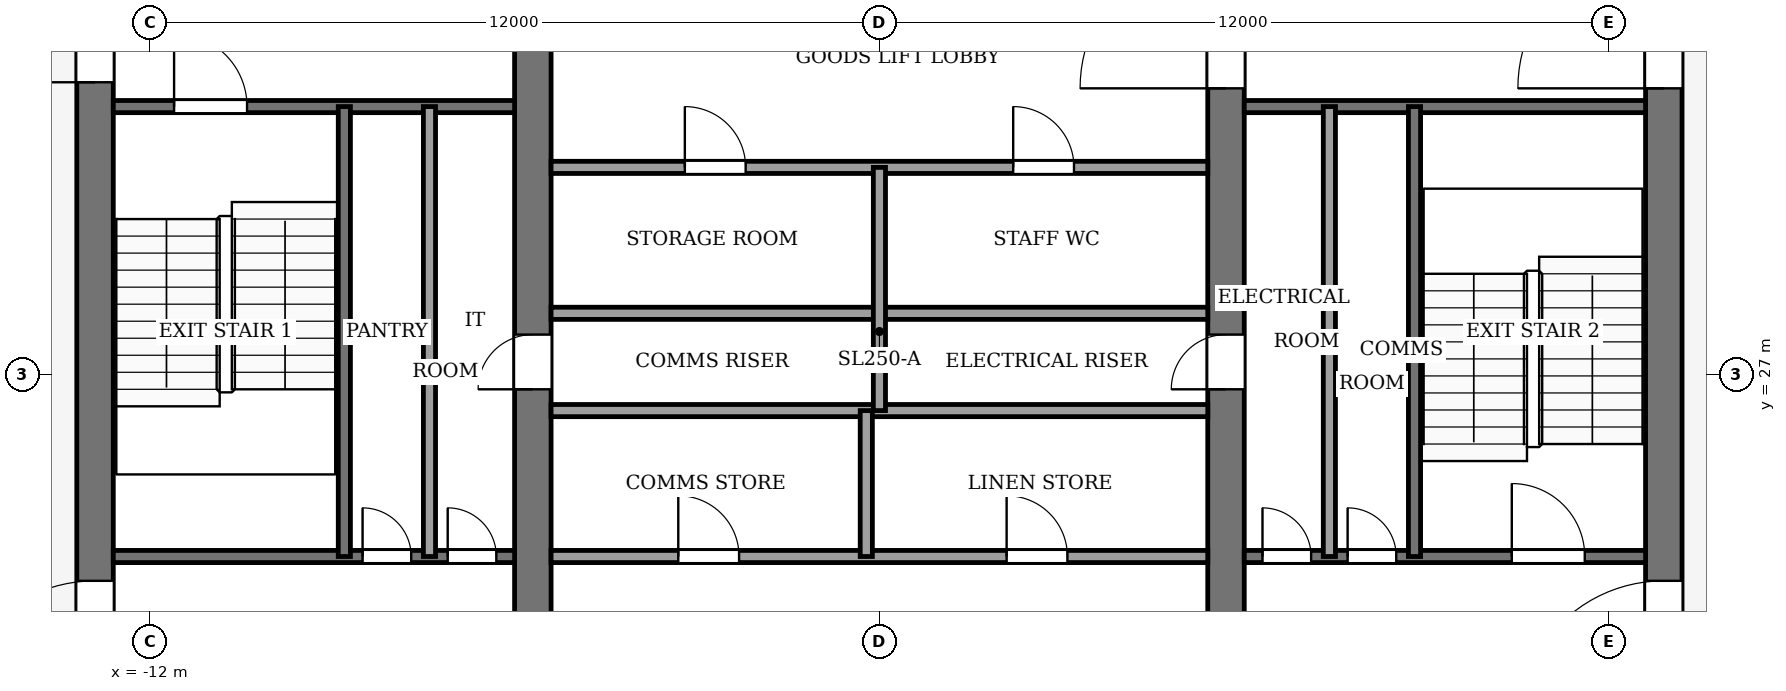
"""IFC4 building model, lengths in metres.
Left out: names, types, materials, properties, quantities, classifications, styles, units other than length and angle.
Written with IfcOpenShell. Run it as: python <this file> out.ifc"""

import sys

from ifc_helpers import new_model, si_unit, direction, frame, frame_2d, origin, place, context, subcontext, project, spatial, rectangle, extrude, element, fill, save


model = new_model("IFC4")
c1 = context("Model", 3, precision=1e-05, world=origin(), true_north=direction((0.0, 1.0)))
c2 = subcontext(c1, "Body", "Model", "MODEL_VIEW")
j1 = project(units=[si_unit("LENGTHUNIT", "METRE"), si_unit("PLANEANGLEUNIT", "RADIAN")], contexts=[c1])
p1 = place(None, origin())
s1 = spatial("IfcSite", under=j1, at=p1, CompositionType="ELEMENT")
p2 = place(p1, origin())
s2 = spatial("IfcBuilding", under=s1, at=p2, CompositionType="ELEMENT")
p3 = place(p2, frame((0.0, 0.0, 302.0)))
s3 = spatial("IfcBuildingStorey", under=s2, at=p3, CompositionType="ELEMENT", Elevation=302.0)
p4 = place(p3, frame((-12.9, 18.4, -0.13), z_axis=(0.0, 0.0, 1.0), x_axis=(0.0, 1.0, 0.0)))
e1 = element("IfcWall", 1, at=p4, inside=s3, PredefinedType="SHEAR", context=c2, shape_type="SweptSolid", body=[
    extrude(rectangle(XDim=19.2, YDim=0.6, at=frame_2d((9.6, 0.0))), origin(), (0.0, 0.0, 1.0), 4.0),
])
p5 = place(p4, frame((2.8, 0.0, 0.13)))
e2 = element("IfcOpeningElement", 2, at=p5, cuts=e1, PredefinedType="OPENING", context=c2, shape_type="SweptSolid", body=[
    extrude(rectangle(XDim=2.4, YDim=2.4, at=frame_2d((1.2, 1.2))), frame((0.0, 0.31, 0.0), z_axis=(0.0, -1.0, 0.0), x_axis=(1.0, 0.0, 0.0)), (0.0, 0.0, 1.0), 0.62),
])
p6 = place(p4, frame((13.4, 0.0, 0.13)))
e3 = element("IfcOpeningElement", 3, at=p6, cuts=e1, PredefinedType="OPENING", context=c2, shape_type="SweptSolid", body=[
    extrude(rectangle(XDim=1.4, YDim=2.2, at=frame_2d((0.7, 1.1))), frame((0.0, 0.31, 0.0), z_axis=(0.0, -1.0, 0.0), x_axis=(1.0, 0.0, 0.0)), (0.0, 0.0, 1.0), 0.62),
])
p7 = place(p3, frame((12.9, 18.4, -0.13), z_axis=(0.0, 0.0, 1.0), x_axis=(0.0, 1.0, 0.0)))
e4 = element("IfcWall", 4, at=p7, inside=s3, PredefinedType="SHEAR", context=c2, shape_type="SweptSolid", body=[
    extrude(rectangle(XDim=19.2, YDim=0.6, at=frame_2d((9.6, 0.0))), origin(), (0.0, 0.0, 1.0), 4.0),
])
p8 = place(p7, frame((2.8, 0.0, 0.13)))
e5 = element("IfcOpeningElement", 5, at=p8, cuts=e4, PredefinedType="OPENING", context=c2, shape_type="SweptSolid", body=[
    extrude(rectangle(XDim=2.4, YDim=2.4, at=frame_2d((1.2, 1.2))), frame((0.0, 0.31, 0.0), z_axis=(0.0, -1.0, 0.0), x_axis=(1.0, 0.0, 0.0)), (0.0, 0.0, 1.0), 0.62),
])
p9 = place(p7, frame((13.3, 0.0, 0.13)))
e6 = element("IfcOpeningElement", 6, at=p9, cuts=e4, PredefinedType="OPENING", context=c2, shape_type="SweptSolid", body=[
    extrude(rectangle(XDim=2.4, YDim=2.4, at=frame_2d((1.2, 1.2))), frame((0.0, 0.31, 0.0), z_axis=(0.0, -1.0, 0.0), x_axis=(1.0, 0.0, 0.0)), (0.0, 0.0, 1.0), 0.62),
])
p10 = place(p3, frame((-5.7, 18.4, -0.13), z_axis=(0.0, 0.0, 1.0), x_axis=(0.0, 1.0, 0.0)))
e7 = element("IfcWall", 7, at=p10, inside=s3, PredefinedType="SHEAR", context=c2, shape_type="SweptSolid", body=[
    extrude(rectangle(XDim=19.2, YDim=0.6, at=frame_2d((9.6, 0.0))), origin(), (0.0, 0.0, 1.0), 4.0),
])
p11 = place(p10, frame((8.35, 0.0, 0.13)))
e8 = element("IfcOpeningElement", 8, at=p11, cuts=e7, PredefinedType="OPENING", context=c2, shape_type="SweptSolid", body=[
    extrude(rectangle(XDim=0.9, YDim=2.1, at=frame_2d((0.45, 1.05))), frame((0.0, 0.31, 0.0), z_axis=(0.0, -1.0, 0.0), x_axis=(1.0, 0.0, 0.0)), (0.0, 0.0, 1.0), 0.62),
])
p12 = place(p3, frame((5.7, 18.4, -0.13), z_axis=(0.0, 0.0, 1.0), x_axis=(0.0, 1.0, 0.0)))
e9 = element("IfcWall", 9, at=p12, inside=s3, PredefinedType="SHEAR", context=c2, shape_type="SweptSolid", body=[
    extrude(rectangle(XDim=19.2, YDim=0.6, at=frame_2d((9.6, 0.0))), origin(), (0.0, 0.0, 1.0), 4.0),
])
p13 = place(p12, frame((8.35, 0.0, 0.13)))
e10 = element("IfcOpeningElement", 10, at=p13, cuts=e9, PredefinedType="OPENING", context=c2, shape_type="SweptSolid", body=[
    extrude(rectangle(XDim=0.9, YDim=2.1, at=frame_2d((0.45, 1.05))), frame((0.0, 0.31, 0.0), z_axis=(0.0, -1.0, 0.0), x_axis=(1.0, 0.0, 0.0)), (0.0, 0.0, 1.0), 0.62),
])
p14 = place(p12, frame((13.3, 0.0, 0.13)))
e11 = element("IfcOpeningElement", 11, at=p14, cuts=e9, PredefinedType="OPENING", context=c2, shape_type="SweptSolid", body=[
    extrude(rectangle(XDim=2.4, YDim=2.4, at=frame_2d((1.2, 1.2))), frame((0.0, 0.31, 0.0), z_axis=(0.0, -1.0, 0.0), x_axis=(1.0, 0.0, 0.0)), (0.0, 0.0, 1.0), 0.62),
])
p15 = place(p3, frame((-12.6, 24.0, 0.0), z_axis=(0.0, 0.0, 1.0), x_axis=(1.0, 0.0, 0.0)))
e12 = element("IfcWall", 12, at=p15, inside=s3, PredefinedType="PARTITIONING", context=c2, shape_type="SweptSolid", body=[
    extrude(rectangle(XDim=6.6, YDim=0.2, at=frame_2d((3.3, 0.0))), origin(), (0.0, 0.0, 1.0), 3.87),
])
p16 = place(p15, frame((4.1, 0.0, 0.0)))
e13 = element("IfcOpeningElement", 13, at=p16, cuts=e12, PredefinedType="OPENING", context=c2, shape_type="SweptSolid", body=[
    extrude(rectangle(XDim=0.8, YDim=2.1, at=frame_2d((0.4, 1.05))), frame((0.0, 0.11, 0.0), z_axis=(0.0, -1.0, 0.0), x_axis=(1.0, 0.0, 0.0)), (0.0, 0.0, 1.0), 0.22),
])
p17 = place(p15, frame((5.5, 0.0, 0.0)))
e14 = element("IfcOpeningElement", 14, at=p17, cuts=e12, PredefinedType="OPENING", context=c2, shape_type="SweptSolid", body=[
    extrude(rectangle(XDim=0.8, YDim=2.1, at=frame_2d((0.4, 1.05))), frame((0.0, 0.11, 0.0), z_axis=(0.0, -1.0, 0.0), x_axis=(1.0, 0.0, 0.0)), (0.0, 0.0, 1.0), 0.22),
])
p18 = place(p3, frame((-5.4, 24.0, 0.0), z_axis=(0.0, 0.0, 1.0), x_axis=(1.0, 0.0, 0.0)))
e15 = element("IfcWall", 15, at=p18, inside=s3, PredefinedType="PARTITIONING", context=c2, shape_type="SweptSolid", body=[
    extrude(rectangle(XDim=10.8, YDim=0.2, at=frame_2d((5.4, 0.0))), origin(), (0.0, 0.0, 1.0), 3.87),
])
p19 = place(p18, frame((2.092, 0.0, 0.0)))
e16 = element("IfcOpeningElement", 16, at=p19, cuts=e15, PredefinedType="OPENING", context=c2, shape_type="SweptSolid", body=[
    extrude(rectangle(XDim=1.0, YDim=2.1, at=frame_2d((0.5, 1.05))), frame((0.0, 0.11, 0.0), z_axis=(0.0, -1.0, 0.0), x_axis=(1.0, 0.0, 0.0)), (0.0, 0.0, 1.0), 0.22),
])
p20 = place(p18, frame((7.492, 0.0, 0.0)))
e17 = element("IfcOpeningElement", 17, at=p20, cuts=e15, PredefinedType="OPENING", context=c2, shape_type="SweptSolid", body=[
    extrude(rectangle(XDim=1.0, YDim=2.1, at=frame_2d((0.5, 1.05))), frame((0.0, 0.11, 0.0), z_axis=(0.0, -1.0, 0.0), x_axis=(1.0, 0.0, 0.0)), (0.0, 0.0, 1.0), 0.22),
])
p21 = place(p3, frame((6.0, 24.0, 0.0), z_axis=(0.0, 0.0, 1.0), x_axis=(1.0, 0.0, 0.0)))
e18 = element("IfcWall", 18, at=p21, inside=s3, PredefinedType="PARTITIONING", context=c2, shape_type="SweptSolid", body=[
    extrude(rectangle(XDim=6.6, YDim=0.2, at=frame_2d((3.3, 0.0))), origin(), (0.0, 0.0, 1.0), 3.87),
])
p22 = place(p21, frame((0.3, 0.0, 0.0)))
e19 = element("IfcOpeningElement", 19, at=p22, cuts=e18, PredefinedType="OPENING", context=c2, shape_type="SweptSolid", body=[
    extrude(rectangle(XDim=0.8, YDim=2.1, at=frame_2d((0.4, 1.05))), frame((0.0, 0.11, 0.0), z_axis=(0.0, -1.0, 0.0), x_axis=(1.0, 0.0, 0.0)), (0.0, 0.0, 1.0), 0.22),
])
p23 = place(p21, frame((1.7, 0.0, 0.0)))
e20 = element("IfcOpeningElement", 20, at=p23, cuts=e18, PredefinedType="OPENING", context=c2, shape_type="SweptSolid", body=[
    extrude(rectangle(XDim=0.8, YDim=2.1, at=frame_2d((0.4, 1.05))), frame((0.0, 0.11, 0.0), z_axis=(0.0, -1.0, 0.0), x_axis=(1.0, 0.0, 0.0)), (0.0, 0.0, 1.0), 0.22),
])
p24 = place(p21, frame((4.4, 0.0, 0.0)))
e21 = element("IfcOpeningElement", 21, at=p24, cuts=e18, PredefinedType="OPENING", context=c2, shape_type="SweptSolid", body=[
    extrude(rectangle(XDim=1.2, YDim=2.2, at=frame_2d((0.6, 1.1))), frame((0.0, 0.11, 0.0), z_axis=(0.0, -1.0, 0.0), x_axis=(1.0, 0.0, 0.0)), (0.0, 0.0, 1.0), 0.22),
])
for number, where, z_axis, x_axis in (
    (22, (-5.4, 26.4, 0.0), (0.0, 0.0, 1.0), (1.0, 0.0, 0.0)),
    (23, (-5.4, 28.0, 0.0), (0.0, 0.0, 1.0), (1.0, 0.0, 0.0)),
):
    element("IfcWall", number, at=place(p3, frame(where, z_axis=z_axis, x_axis=x_axis)), inside=s3, PredefinedType="PARTITIONING", context=c2, shape_type="SweptSolid", body=[
        extrude(rectangle(XDim=10.8, YDim=0.2, at=frame_2d((5.4, 0.0))), origin(), (0.0, 0.0, 1.0), 3.87),
    ])
p25 = place(p3, frame((-5.4, 30.4, 0.0), z_axis=(0.0, 0.0, 1.0), x_axis=(1.0, 0.0, 0.0)))
e24 = element("IfcWall", 24, at=p25, inside=s3, PredefinedType="PARTITIONING", context=c2, shape_type="SweptSolid", body=[
    extrude(rectangle(XDim=10.8, YDim=0.2, at=frame_2d((5.4, 0.0))), origin(), (0.0, 0.0, 1.0), 3.87),
])
p26 = place(p25, frame((2.2, 0.0, 0.0)))
e25 = element("IfcOpeningElement", 25, at=p26, cuts=e24, PredefinedType="OPENING", context=c2, shape_type="SweptSolid", body=[
    extrude(rectangle(XDim=1.0, YDim=2.1, at=frame_2d((0.5, 1.05))), frame((0.0, 0.11, 0.0), z_axis=(0.0, -1.0, 0.0), x_axis=(1.0, 0.0, 0.0)), (0.0, 0.0, 1.0), 0.22),
])
p27 = place(p25, frame((7.6, 0.0, 0.0)))
e26 = element("IfcOpeningElement", 26, at=p27, cuts=e24, PredefinedType="OPENING", context=c2, shape_type="SweptSolid", body=[
    extrude(rectangle(XDim=1.0, YDim=2.1, at=frame_2d((0.5, 1.05))), frame((0.0, 0.11, 0.0), z_axis=(0.0, -1.0, 0.0), x_axis=(1.0, 0.0, 0.0)), (0.0, 0.0, 1.0), 0.22),
])
p28 = place(p3, frame((-12.6, 31.4, 0.0), z_axis=(0.0, 0.0, 1.0), x_axis=(1.0, 0.0, 0.0)))
e27 = element("IfcWall", 27, at=p28, inside=s3, PredefinedType="PARTITIONING", context=c2, shape_type="SweptSolid", body=[
    extrude(rectangle(XDim=6.6, YDim=0.2, at=frame_2d((3.3, 0.0))), origin(), (0.0, 0.0, 1.0), 3.87),
])
p29 = place(p28, frame((1.0, 0.0, 0.0)))
e28 = element("IfcOpeningElement", 28, at=p29, cuts=e27, PredefinedType="OPENING", context=c2, shape_type="SweptSolid", body=[
    extrude(rectangle(XDim=1.2, YDim=2.2, at=frame_2d((0.6, 1.1))), frame((0.0, 0.11, 0.0), z_axis=(0.0, -1.0, 0.0), x_axis=(1.0, 0.0, 0.0)), (0.0, 0.0, 1.0), 0.22),
])
p30 = place(p3, frame((6.0, 31.4, 0.0), z_axis=(0.0, 0.0, 1.0), x_axis=(1.0, 0.0, 0.0)))
e29 = element("IfcWall", 29, at=p30, inside=s3, PredefinedType="PARTITIONING", context=c2, shape_type="SweptSolid", body=[
    extrude(rectangle(XDim=6.6, YDim=0.2, at=frame_2d((3.3, 0.0))), origin(), (0.0, 0.0, 1.0), 3.87),
])
for number, where, z_axis, x_axis in (
    (30, (-8.8, 24.0, 0.0), (0.0, 0.0, 1.0), (0.0, 1.0, 0.0)),
    (31, (-7.4, 24.0, 0.0), (0.0, 0.0, 1.0), (0.0, 1.0, 0.0)),
):
    element("IfcWall", number, at=place(p3, frame(where, z_axis=z_axis, x_axis=x_axis)), inside=s3, PredefinedType="PARTITIONING", context=c2, shape_type="SweptSolid", body=[
        extrude(rectangle(XDim=7.4, YDim=0.2, at=frame_2d((3.7, 0.0))), origin(), (0.0, 0.0, 1.0), 3.87),
    ])
p31 = place(p3, frame((-0.216, 24.0, 0.0), z_axis=(0.0, 0.0, 1.0), x_axis=(0.0, 1.0, 0.0)))
e32 = element("IfcWall", 32, at=p31, inside=s3, PredefinedType="PARTITIONING", context=c2, shape_type="SweptSolid", body=[
    extrude(rectangle(XDim=2.4, YDim=0.2, at=frame_2d((1.2, 0.0))), origin(), (0.0, 0.0, 1.0), 3.87),
])
p32 = place(p3, frame((0.0, 26.4, 0.0), z_axis=(0.0, 0.0, 1.0), x_axis=(0.0, 1.0, 0.0)))
e33 = element("IfcWall", 33, at=p32, inside=s3, PredefinedType="PARTITIONING", context=c2, shape_type="SweptSolid", body=[
    extrude(rectangle(XDim=4.0, YDim=0.2, at=frame_2d((2.0, 0.0))), origin(), (0.0, 0.0, 1.0), 3.87),
])
for number, where, z_axis, x_axis in (
    (34, (7.4, 24.0, 0.0), (0.0, 0.0, 1.0), (0.0, 1.0, 0.0)),
    (35, (8.8, 24.0, 0.0), (0.0, 0.0, 1.0), (0.0, 1.0, 0.0)),
):
    element("IfcWall", number, at=place(p3, frame(where, z_axis=z_axis, x_axis=x_axis)), inside=s3, PredefinedType="PARTITIONING", context=c2, shape_type="SweptSolid", body=[
        extrude(rectangle(XDim=7.4, YDim=0.2, at=frame_2d((3.7, 0.0))), origin(), (0.0, 0.0, 1.0), 3.87),
    ])
p33 = place(p19, origin())
e36 = element("IfcDoor", 36, at=p33, inside=s3, OperationType="SINGLE_SWING_RIGHT", PredefinedType="DOOR", context=c2, shape_type="SweptSolid", body=[
    extrude(rectangle(XDim=1.0, YDim=2.1, at=frame_2d((0.5, 1.05))), frame((0.0, 0.025, 0.0), z_axis=(0.0, -1.0, 0.0), x_axis=(1.0, 0.0, 0.0)), (0.0, 0.0, 1.0), 0.05),
])
fill(e16, e36)
p34 = place(p20, origin())
e37 = element("IfcDoor", 37, at=p34, inside=s3, OperationType="SINGLE_SWING_LEFT", PredefinedType="DOOR", context=c2, shape_type="SweptSolid", body=[
    extrude(rectangle(XDim=1.0, YDim=2.1, at=frame_2d((0.5, 1.05))), frame((0.0, 0.025, 0.0), z_axis=(0.0, -1.0, 0.0), x_axis=(1.0, 0.0, 0.0)), (0.0, 0.0, 1.0), 0.05),
])
fill(e17, e37)
p35 = place(p26, origin())
e38 = element("IfcDoor", 38, at=p35, inside=s3, OperationType="SINGLE_SWING_LEFT", PredefinedType="DOOR", context=c2, shape_type="SweptSolid", body=[
    extrude(rectangle(XDim=1.0, YDim=2.1, at=frame_2d((0.5, 1.05))), frame((0.0, 0.025, 0.0), z_axis=(0.0, -1.0, 0.0), x_axis=(1.0, 0.0, 0.0)), (0.0, 0.0, 1.0), 0.05),
])
fill(e25, e38)
p36 = place(p27, origin())
e39 = element("IfcDoor", 39, at=p36, inside=s3, OperationType="SINGLE_SWING_RIGHT", PredefinedType="DOOR", context=c2, shape_type="SweptSolid", body=[
    extrude(rectangle(XDim=1.0, YDim=2.1, at=frame_2d((0.5, 1.05))), frame((0.0, 0.025, 0.0), z_axis=(0.0, -1.0, 0.0), x_axis=(1.0, 0.0, 0.0)), (0.0, 0.0, 1.0), 0.05),
])
fill(e26, e39)
p37 = place(p16, origin())
e40 = element("IfcDoor", 40, at=p37, inside=s3, OperationType="SINGLE_SWING_RIGHT", PredefinedType="DOOR", context=c2, shape_type="SweptSolid", body=[
    extrude(rectangle(XDim=0.8, YDim=2.1, at=frame_2d((0.4, 1.05))), frame((0.0, 0.025, 0.0), z_axis=(0.0, -1.0, 0.0), x_axis=(1.0, 0.0, 0.0)), (0.0, 0.0, 1.0), 0.05),
])
fill(e13, e40)
p38 = place(p17, origin())
e41 = element("IfcDoor", 41, at=p38, inside=s3, OperationType="SINGLE_SWING_LEFT", PredefinedType="DOOR", context=c2, shape_type="SweptSolid", body=[
    extrude(rectangle(XDim=0.8, YDim=2.1, at=frame_2d((0.4, 1.05))), frame((0.0, 0.025, 0.0), z_axis=(0.0, -1.0, 0.0), x_axis=(1.0, 0.0, 0.0)), (0.0, 0.0, 1.0), 0.05),
])
fill(e14, e41)
p39 = place(p22, origin())
e42 = element("IfcDoor", 42, at=p39, inside=s3, OperationType="SINGLE_SWING_RIGHT", PredefinedType="DOOR", context=c2, shape_type="SweptSolid", body=[
    extrude(rectangle(XDim=0.8, YDim=2.1, at=frame_2d((0.4, 1.05))), frame((0.0, 0.025, 0.0), z_axis=(0.0, -1.0, 0.0), x_axis=(1.0, 0.0, 0.0)), (0.0, 0.0, 1.0), 0.05),
])
fill(e19, e42)
p40 = place(p23, origin())
e43 = element("IfcDoor", 43, at=p40, inside=s3, OperationType="SINGLE_SWING_LEFT", PredefinedType="DOOR", context=c2, shape_type="SweptSolid", body=[
    extrude(rectangle(XDim=0.8, YDim=2.1, at=frame_2d((0.4, 1.05))), frame((0.0, 0.025, 0.0), z_axis=(0.0, -1.0, 0.0), x_axis=(1.0, 0.0, 0.0)), (0.0, 0.0, 1.0), 0.05),
])
fill(e20, e43)
p41 = place(p11, origin())
e44 = element("IfcDoor", 44, at=p41, inside=s3, OperationType="SINGLE_SWING_LEFT", PredefinedType="DOOR", context=c2, shape_type="SweptSolid", body=[
    extrude(rectangle(XDim=0.9, YDim=2.1, at=frame_2d((0.45, 1.05))), frame((0.0, 0.025, 0.0), z_axis=(0.0, -1.0, 0.0), x_axis=(1.0, 0.0, 0.0)), (0.0, 0.0, 1.0), 0.05),
])
fill(e8, e44)
p42 = place(p13, origin())
e45 = element("IfcDoor", 45, at=p42, inside=s3, OperationType="SINGLE_SWING_RIGHT", PredefinedType="DOOR", context=c2, shape_type="SweptSolid", body=[
    extrude(rectangle(XDim=0.9, YDim=2.1, at=frame_2d((0.45, 1.05))), frame((0.0, 0.025, 0.0), z_axis=(0.0, -1.0, 0.0), x_axis=(1.0, 0.0, 0.0)), (0.0, 0.0, 1.0), 0.05),
])
fill(e10, e45)
p43 = place(p29, origin())
e46 = element("IfcDoor", 46, at=p43, inside=s3, OperationType="SINGLE_SWING_RIGHT", PredefinedType="DOOR", context=c2, shape_type="SweptSolid", body=[
    extrude(rectangle(XDim=1.2, YDim=2.2, at=frame_2d((0.6, 1.1))), frame((0.0, 0.025, 0.0), z_axis=(0.0, -1.0, 0.0), x_axis=(1.0, 0.0, 0.0)), (0.0, 0.0, 1.0), 0.05),
])
fill(e28, e46)
p44 = place(p24, origin())
e47 = element("IfcDoor", 47, at=p44, inside=s3, OperationType="SINGLE_SWING_LEFT", PredefinedType="DOOR", context=c2, shape_type="SweptSolid", body=[
    extrude(rectangle(XDim=1.2, YDim=2.2, at=frame_2d((0.6, 1.1))), frame((0.0, 0.025, 0.0), z_axis=(0.0, -1.0, 0.0), x_axis=(1.0, 0.0, 0.0)), (0.0, 0.0, 1.0), 0.05),
])
fill(e21, e47)
p45 = place(p14, origin())
e48 = element("IfcDoor", 48, at=p45, inside=s3, OperationType="DOUBLE_DOOR_SINGLE_SWING", PredefinedType="DOOR", context=c2, shape_type="SweptSolid", body=[
    extrude(rectangle(XDim=2.4, YDim=2.4, at=frame_2d((1.2, 1.2))), frame((0.0, 0.025, 0.0), z_axis=(0.0, -1.0, 0.0), x_axis=(1.0, 0.0, 0.0)), (0.0, 0.0, 1.0), 0.05),
])
fill(e11, e48)
p46 = place(p5, origin())
e49 = element("IfcDoor", 49, at=p46, inside=s3, OperationType="DOUBLE_DOOR_SINGLE_SWING", PredefinedType="DOOR", context=c2, shape_type="SweptSolid", body=[
    extrude(rectangle(XDim=2.4, YDim=2.4, at=frame_2d((1.2, 1.2))), frame((0.0, 0.025, 0.0), z_axis=(0.0, -1.0, 0.0), x_axis=(1.0, 0.0, 0.0)), (0.0, 0.0, 1.0), 0.05),
])
fill(e2, e49)
p47 = place(p8, origin())
e50 = element("IfcDoor", 50, at=p47, inside=s3, OperationType="DOUBLE_DOOR_SINGLE_SWING", PredefinedType="DOOR", context=c2, shape_type="SweptSolid", body=[
    extrude(rectangle(XDim=2.4, YDim=2.4, at=frame_2d((1.2, 1.2))), frame((0.0, 0.025, 0.0), z_axis=(0.0, -1.0, 0.0), x_axis=(1.0, 0.0, 0.0)), (0.0, 0.0, 1.0), 0.05),
])
fill(e5, e50)
p48 = place(p9, origin())
e51 = element("IfcDoor", 51, at=p48, inside=s3, OperationType="DOUBLE_DOOR_SINGLE_SWING", PredefinedType="DOOR", context=c2, shape_type="SweptSolid", body=[
    extrude(rectangle(XDim=2.4, YDim=2.4, at=frame_2d((1.2, 1.2))), frame((0.0, 0.025, 0.0), z_axis=(0.0, -1.0, 0.0), x_axis=(1.0, 0.0, 0.0)), (0.0, 0.0, 1.0), 0.05),
])
fill(e6, e51)
p49 = place(p6, origin())
e52 = element("IfcDoor", 52, at=p49, inside=s3, OperationType="SINGLE_SWING_RIGHT", PredefinedType="DOOR", context=c2, shape_type="SweptSolid", body=[
    extrude(rectangle(XDim=1.4, YDim=2.2, at=frame_2d((0.7, 1.1))), frame((0.0, 0.025, 0.0), z_axis=(0.0, -1.0, 0.0), x_axis=(1.0, 0.0, 0.0)), (0.0, 0.0, 1.0), 0.05),
])
fill(e3, e52)
save(model, sys.argv[1])
